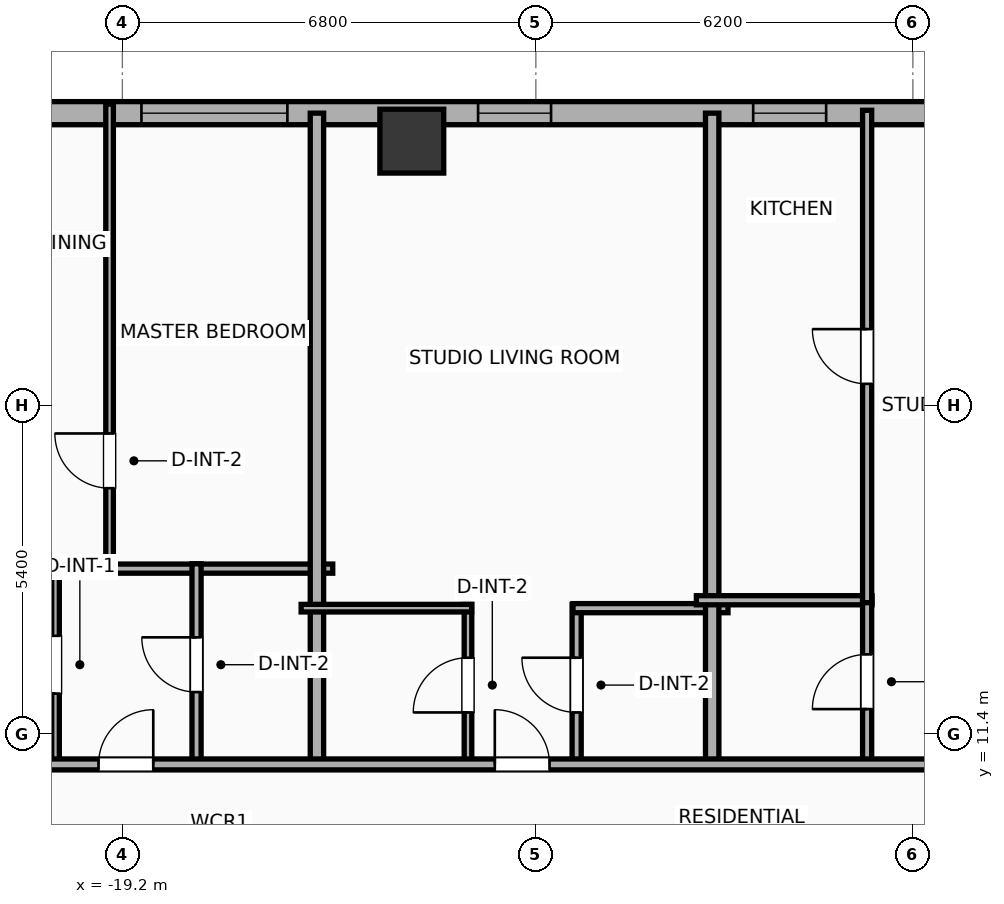
"""IFC4 building model, lengths in metres.
Left out: names, types, materials, properties, quantities, classifications, styles, units other than length and angle.
Written with IfcOpenShell. Run it as: python <this file> out.ifc"""

import sys

from ifc_helpers import new_model, si_unit, direction, frame, frame_2d, origin, origin_2d, place, context, subcontext, project, spatial, rectangle, hollow_rectangle, extrude, element, fill, save


model = new_model("IFC4")
c1 = context("Model", 3, precision=1e-05, world=origin(), true_north=direction((0.0, 1.0)))
c2 = subcontext(c1, "Body", "Model", "MODEL_VIEW")
j1 = project(units=[si_unit("LENGTHUNIT", "METRE"), si_unit("PLANEANGLEUNIT", "RADIAN")], contexts=[c1])
p1 = place(None, origin())
s1 = spatial("IfcSite", under=j1, at=p1, CompositionType="ELEMENT")
p2 = place(p1, origin())
s2 = spatial("IfcBuilding", under=s1, at=p2, CompositionType="ELEMENT")
p3 = place(p2, frame((0.0, 0.0, 89.7)))
s3 = spatial("IfcBuildingStorey", under=s2, at=p3, CompositionType="ELEMENT", Elevation=89.7)
p4 = place(p3, frame((-14.44, 21.15, 0.0), z_axis=(0.0, 0.0, 1.0), x_axis=(1.0, 0.0, 0.0)))
e1 = element("IfcColumn", 1, at=p4, inside=s3, PredefinedType="COLUMN", context=c2, shape_type="SweptSolid", body=[
    extrude(hollow_rectangle(XDim=1.05, YDim=1.05, WallThickness=0.036, at=origin_2d()), origin(), (0.0, 0.0, 1.0), 3.9),
])
p5 = place(p3, frame((-25.381, 21.61, 0.0), z_axis=(0.0, 0.0, 1.0), x_axis=(1.0, 0.0, 0.0)))
e2 = element("IfcWall", 2, at=p5, inside=s3, PredefinedType="ELEMENTEDWALL", context=c2, shape_type="SweptSolid", body=[
    extrude(rectangle(XDim=54.763, YDim=0.38, at=frame_2d((27.381, 0.0))), origin(), (0.0, 0.0, 1.0), 2.54),
])
p6 = place(p5, frame((6.495, 0.0, 0.75)))
e3 = element("IfcOpeningElement", 3, at=p6, cuts=e2, PredefinedType="OPENING", context=c2, shape_type="SweptSolid", body=[
    extrude(rectangle(XDim=2.4, YDim=1.63, at=frame_2d((1.2, 0.815))), frame((0.0, 0.2, 0.0), z_axis=(0.0, -1.0, 0.0), x_axis=(1.0, 0.0, 0.0)), (0.0, 0.0, 1.0), 0.4),
])
p7 = place(p5, frame((48.367, 0.0, 0.75)))
e4 = element("IfcOpeningElement", 4, at=p7, cuts=e2, PredefinedType="OPENING", context=c2, shape_type="SweptSolid", body=[
    extrude(rectangle(XDim=2.4, YDim=1.63, at=frame_2d((1.2, 0.815))), frame((0.0, 0.2, 0.0), z_axis=(0.0, -1.0, 0.0), x_axis=(1.0, 0.0, 0.0)), (0.0, 0.0, 1.0), 0.4),
])
p8 = place(p5, frame((1.231, 0.0, 0.75)))
e5 = element("IfcOpeningElement", 5, at=p8, cuts=e2, PredefinedType="OPENING", context=c2, shape_type="SweptSolid", body=[
    extrude(rectangle(XDim=1.2, YDim=1.63, at=frame_2d((0.6, 0.815))), frame((0.0, 0.2, 0.0), z_axis=(0.0, -1.0, 0.0), x_axis=(1.0, 0.0, 0.0)), (0.0, 0.0, 1.0), 0.4),
])
p9 = place(p5, frame((3.772, 0.0, 0.75)))
e6 = element("IfcOpeningElement", 6, at=p9, cuts=e2, PredefinedType="OPENING", context=c2, shape_type="SweptSolid", body=[
    extrude(rectangle(XDim=1.2, YDim=1.63, at=frame_2d((0.6, 0.815))), frame((0.0, 0.2, 0.0), z_axis=(0.0, -1.0, 0.0), x_axis=(1.0, 0.0, 0.0)), (0.0, 0.0, 1.0), 0.4),
])
p10 = place(p5, frame((12.031, 0.0, 0.75)))
e7 = element("IfcOpeningElement", 7, at=p10, cuts=e2, PredefinedType="OPENING", context=c2, shape_type="SweptSolid", body=[
    extrude(rectangle(XDim=1.2, YDim=1.63, at=frame_2d((0.6, 0.815))), frame((0.0, 0.2, 0.0), z_axis=(0.0, -1.0, 0.0), x_axis=(1.0, 0.0, 0.0)), (0.0, 0.0, 1.0), 0.4),
])
p11 = place(p5, frame((19.805, 0.0, 0.75)))
e8 = element("IfcOpeningElement", 8, at=p11, cuts=e2, PredefinedType="OPENING", context=c2, shape_type="SweptSolid", body=[
    extrude(rectangle(XDim=1.2, YDim=1.63, at=frame_2d((0.6, 0.815))), frame((0.0, 0.2, 0.0), z_axis=(0.0, -1.0, 0.0), x_axis=(1.0, 0.0, 0.0)), (0.0, 0.0, 1.0), 0.4),
])
p12 = place(p5, frame((16.555, 0.0, 0.75)))
e9 = element("IfcOpeningElement", 9, at=p12, cuts=e2, PredefinedType="OPENING", context=c2, shape_type="SweptSolid", body=[
    extrude(rectangle(XDim=1.2, YDim=1.63, at=frame_2d((0.6, 0.815))), frame((0.0, 0.2, 0.0), z_axis=(0.0, -1.0, 0.0), x_axis=(1.0, 0.0, 0.0)), (0.0, 0.0, 1.0), 0.4),
])
p13 = place(p5, frame((23.866, 0.0, 0.75)))
e10 = element("IfcOpeningElement", 10, at=p13, cuts=e2, PredefinedType="OPENING", context=c2, shape_type="SweptSolid", body=[
    extrude(rectangle(XDim=1.2, YDim=1.63, at=frame_2d((0.6, 0.815))), frame((0.0, 0.2, 0.0), z_axis=(0.0, -1.0, 0.0), x_axis=(1.0, 0.0, 0.0)), (0.0, 0.0, 1.0), 0.4),
])
p14 = place(p5, frame((27.116, 0.0, 0.75)))
e11 = element("IfcOpeningElement", 11, at=p14, cuts=e2, PredefinedType="OPENING", context=c2, shape_type="SweptSolid", body=[
    extrude(rectangle(XDim=1.2, YDim=1.63, at=frame_2d((0.6, 0.815))), frame((0.0, 0.2, 0.0), z_axis=(0.0, -1.0, 0.0), x_axis=(1.0, 0.0, 0.0)), (0.0, 0.0, 1.0), 0.4),
])
p15 = place(p5, frame((30.931, 0.0, 0.75)))
e12 = element("IfcOpeningElement", 12, at=p15, cuts=e2, PredefinedType="OPENING", context=c2, shape_type="SweptSolid", body=[
    extrude(rectangle(XDim=1.2, YDim=1.63, at=frame_2d((0.6, 0.815))), frame((0.0, 0.2, 0.0), z_axis=(0.0, -1.0, 0.0), x_axis=(1.0, 0.0, 0.0)), (0.0, 0.0, 1.0), 0.4),
])
p16 = place(p5, frame((36.733, 0.0, 0.75)))
e13 = element("IfcOpeningElement", 13, at=p16, cuts=e2, PredefinedType="OPENING", context=c2, shape_type="SweptSolid", body=[
    extrude(rectangle(XDim=1.2, YDim=1.63, at=frame_2d((0.6, 0.815))), frame((0.0, 0.2, 0.0), z_axis=(0.0, -1.0, 0.0), x_axis=(1.0, 0.0, 0.0)), (0.0, 0.0, 1.0), 0.4),
])
p17 = place(p5, frame((39.858, 0.0, 0.75)))
e14 = element("IfcOpeningElement", 14, at=p17, cuts=e2, PredefinedType="OPENING", context=c2, shape_type="SweptSolid", body=[
    extrude(rectangle(XDim=1.2, YDim=1.63, at=frame_2d((0.6, 0.815))), frame((0.0, 0.2, 0.0), z_axis=(0.0, -1.0, 0.0), x_axis=(1.0, 0.0, 0.0)), (0.0, 0.0, 1.0), 0.4),
])
p18 = place(p5, frame((44.636, 0.0, 0.75)))
e15 = element("IfcOpeningElement", 15, at=p18, cuts=e2, PredefinedType="OPENING", context=c2, shape_type="SweptSolid", body=[
    extrude(rectangle(XDim=1.2, YDim=1.63, at=frame_2d((0.6, 0.815))), frame((0.0, 0.2, 0.0), z_axis=(0.0, -1.0, 0.0), x_axis=(1.0, 0.0, 0.0)), (0.0, 0.0, 1.0), 0.4),
])
p19 = place(p5, frame((51.809, 0.0, 0.75)))
e16 = element("IfcOpeningElement", 16, at=p19, cuts=e2, PredefinedType="OPENING", context=c2, shape_type="SweptSolid", body=[
    extrude(rectangle(XDim=1.2, YDim=1.63, at=frame_2d((0.6, 0.815))), frame((0.0, 0.2, 0.0), z_axis=(0.0, -1.0, 0.0), x_axis=(1.0, 0.0, 0.0)), (0.0, 0.0, 1.0), 0.4),
])
p20 = place(p3, frame((-19.41, 14.04, 0.0), z_axis=(0.0, 0.0, 1.0), x_axis=(0.0, 1.0, 0.0)))
e17 = element("IfcWall", 17, at=p20, inside=s3, PredefinedType="PARTITIONING", context=c2, shape_type="SweptSolid", body=[
    extrude(rectangle(XDim=7.72, YDim=0.125, at=frame_2d((3.86, 0.0))), origin(), (0.0, 0.0, 1.0), 3.65),
])
p21 = place(p20, frame((1.403, 0.0, 0.0)))
e18 = element("IfcOpeningElement", 18, at=p21, cuts=e17, PredefinedType="OPENING", context=c2, shape_type="SweptSolid", body=[
    extrude(rectangle(XDim=0.9, YDim=2.05, at=frame_2d((0.45, 1.025))), frame((0.0, 0.073, 0.0), z_axis=(0.0, -1.0, 0.0), x_axis=(1.0, 0.0, 0.0)), (0.0, 0.0, 1.0), 0.145),
])
p22 = place(p3, frame((-19.53, 14.12, 0.0), z_axis=(0.0, 0.0, 1.0), x_axis=(1.0, 0.0, 0.0)))
e19 = element("IfcWall", 19, at=p22, inside=s3, PredefinedType="PLUMBINGWALL", context=c2, shape_type="SweptSolid", body=[
    extrude(rectangle(XDim=3.79, YDim=0.15, at=frame_2d((1.895, 0.0))), origin(), (0.0, 0.0, 1.0), 3.65),
])
p23 = place(p3, frame((-20.299, 10.88, 0.0), z_axis=(0.0, 0.0, 1.0), x_axis=(0.0, 1.0, 0.0)))
e20 = element("IfcWall", 20, at=p23, inside=s3, PredefinedType="PARTITIONING", context=c2, shape_type="SweptSolid", body=[
    extrude(rectangle(XDim=3.32, YDim=0.125, at=frame_2d((1.66, 0.0))), origin(), (0.0, 0.0, 1.0), 3.65),
])
p24 = place(p23, frame((1.185, 0.0, 0.0)))
e21 = element("IfcOpeningElement", 21, at=p24, cuts=e20, PredefinedType="OPENING", context=c2, shape_type="SweptSolid", body=[
    extrude(rectangle(XDim=0.95, YDim=2.05, at=frame_2d((0.475, 1.025))), frame((0.0, 0.073, 0.0), z_axis=(0.0, -1.0, 0.0), x_axis=(1.0, 0.0, 0.0)), (0.0, 0.0, 1.0), 0.145),
])
p25 = place(p3, frame((-22.684, 14.12, 0.0), z_axis=(0.0, 0.0, 1.0), x_axis=(1.0, 0.0, 0.0)))
e22 = element("IfcWall", 22, at=p25, inside=s3, PredefinedType="PARTITIONING", context=c2, shape_type="SweptSolid", body=[
    extrude(rectangle(XDim=2.505, YDim=0.125, at=frame_2d((1.252, 0.0))), origin(), (0.0, 0.0, 1.0), 3.65),
])
p26 = place(p3, frame((-17.98, 10.88, 0.0), z_axis=(0.0, 0.0, 1.0), x_axis=(0.0, 1.0, 0.0)))
e23 = element("IfcWall", 23, at=p26, inside=s3, PredefinedType="PLUMBINGWALL", context=c2, shape_type="SweptSolid", body=[
    extrude(rectangle(XDim=3.32, YDim=0.15, at=frame_2d((1.66, 0.0))), origin(), (0.0, 0.0, 1.0), 3.65),
])
p27 = place(p26, frame((1.21, 0.0, 0.0)))
e24 = element("IfcOpeningElement", 24, at=p27, cuts=e23, PredefinedType="OPENING", context=c2, shape_type="SweptSolid", body=[
    extrude(rectangle(XDim=0.9, YDim=2.05, at=frame_2d((0.45, 1.025))), frame((0.0, 0.085, 0.0), z_axis=(0.0, -1.0, 0.0), x_axis=(1.0, 0.0, 0.0)), (0.0, 0.0, 1.0), 0.17),
])
p28 = place(p3, frame((-16.0, 10.82, 0.0), z_axis=(0.0, 0.0, 1.0), x_axis=(0.0, 1.0, 0.0)))
e25 = element("IfcWall", 25, at=p28, inside=s3, PredefinedType="PARTITIONING", context=c2, shape_type="SweptSolid", body=[
    extrude(rectangle(XDim=10.79, YDim=0.22, at=frame_2d((5.395, 0.0))), origin(), (0.0, 0.0, 1.0), 3.65),
])
p29 = place(p3, frame((-13.516, 10.88, 0.0), z_axis=(0.0, 0.0, 1.0), x_axis=(0.0, 1.0, 0.0)))
e26 = element("IfcWall", 26, at=p29, inside=s3, PredefinedType="PARTITIONING", context=c2, shape_type="SweptSolid", body=[
    extrude(rectangle(XDim=2.65, YDim=0.125, at=frame_2d((1.325, 0.0))), origin(), (0.0, 0.0, 1.0), 3.65),
])
p30 = place(p29, frame((0.875, 0.0, 0.0)))
e27 = element("IfcOpeningElement", 27, at=p30, cuts=e26, PredefinedType="OPENING", context=c2, shape_type="SweptSolid", body=[
    extrude(rectangle(XDim=0.9, YDim=2.05, at=frame_2d((0.45, 1.025))), frame((0.0, 0.073, 0.0), z_axis=(0.0, -1.0, 0.0), x_axis=(1.0, 0.0, 0.0)), (0.0, 0.0, 1.0), 0.145),
])
p31 = place(p3, frame((-11.729, 10.88, 0.0), z_axis=(0.0, 0.0, 1.0), x_axis=(0.0, 1.0, 0.0)))
e28 = element("IfcWall", 28, at=p31, inside=s3, PredefinedType="PLUMBINGWALL", context=c2, shape_type="SweptSolid", body=[
    extrude(rectangle(XDim=2.65, YDim=0.15, at=frame_2d((1.325, 0.0))), origin(), (0.0, 0.0, 1.0), 3.65),
])
p32 = place(p31, frame((0.875, 0.0, 0.0)))
e29 = element("IfcOpeningElement", 29, at=p32, cuts=e28, PredefinedType="OPENING", context=c2, shape_type="SweptSolid", body=[
    extrude(rectangle(XDim=0.9, YDim=2.05, at=frame_2d((0.45, 1.025))), frame((0.0, 0.085, 0.0), z_axis=(0.0, -1.0, 0.0), x_axis=(1.0, 0.0, 0.0)), (0.0, 0.0, 1.0), 0.17),
])
p33 = place(p3, frame((-16.26, 13.47, 0.0), z_axis=(0.0, 0.0, 1.0), x_axis=(1.0, 0.0, 0.0)))
e30 = element("IfcWall", 30, at=p33, inside=s3, PredefinedType="PARTITIONING", context=c2, shape_type="SweptSolid", body=[
    extrude(rectangle(XDim=2.804, YDim=0.125, at=frame_2d((1.402, 0.0))), origin(), (0.0, 0.0, 1.0), 3.65),
])
p34 = place(p3, frame((-11.789, 13.47, 0.0), z_axis=(0.0, 0.0, 1.0), x_axis=(1.0, 0.0, 0.0)))
e31 = element("IfcWall", 31, at=p34, inside=s3, PredefinedType="PLUMBINGWALL", context=c2, shape_type="SweptSolid", body=[
    extrude(rectangle(XDim=2.549, YDim=0.15, at=frame_2d((1.274, 0.0))), origin(), (0.0, 0.0, 1.0), 3.65),
])
p35 = place(p3, frame((-9.5, 10.82, 0.0), z_axis=(0.0, 0.0, 1.0), x_axis=(0.0, 1.0, 0.0)))
e32 = element("IfcWall", 32, at=p35, inside=s3, PredefinedType="PARTITIONING", context=c2, shape_type="SweptSolid", body=[
    extrude(rectangle(XDim=10.79, YDim=0.22, at=frame_2d((5.395, 0.0))), origin(), (0.0, 0.0, 1.0), 3.65),
])
p36 = place(p3, frame((-9.76, 13.6, 0.0), z_axis=(0.0, 0.0, 1.0), x_axis=(1.0, 0.0, 0.0)))
e33 = element("IfcWall", 33, at=p36, inside=s3, PredefinedType="PLUMBINGWALL", context=c2, shape_type="SweptSolid", body=[
    extrude(rectangle(XDim=2.888, YDim=0.15, at=frame_2d((1.444, 0.0))), origin(), (0.0, 0.0, 1.0), 3.65),
])
p37 = place(p3, frame((-6.952, 10.88, 0.0), z_axis=(0.0, 0.0, 1.0), x_axis=(0.0, 1.0, 0.0)))
e34 = element("IfcWall", 34, at=p37, inside=s3, PredefinedType="PLUMBINGWALL", context=c2, shape_type="SweptSolid", body=[
    extrude(rectangle(XDim=2.76, YDim=0.15, at=frame_2d((1.38, 0.0))), origin(), (0.0, 0.0, 1.0), 3.65),
])
p38 = place(p37, frame((0.93, 0.0, 0.0)))
e35 = element("IfcOpeningElement", 35, at=p38, cuts=e34, PredefinedType="OPENING", context=c2, shape_type="SweptSolid", body=[
    extrude(rectangle(XDim=0.9, YDim=2.05, at=frame_2d((0.45, 1.025))), frame((0.0, 0.085, 0.0), z_axis=(0.0, -1.0, 0.0), x_axis=(1.0, 0.0, 0.0)), (0.0, 0.0, 1.0), 0.17),
])
p39 = place(p3, frame((-6.952, 13.56, 0.0), z_axis=(0.0, 0.0, 1.0), x_axis=(0.0, 1.0, 0.0)))
e36 = element("IfcWall", 36, at=p39, inside=s3, PredefinedType="PLUMBINGWALL", context=c2, shape_type="SweptSolid", body=[
    extrude(rectangle(XDim=8.098, YDim=0.15, at=frame_2d((4.049, 0.0))), origin(), (0.0, 0.0, 1.0), 3.65),
])
p40 = place(p39, frame((3.599, 0.0, 0.0)))
e37 = element("IfcOpeningElement", 37, at=p40, cuts=e36, PredefinedType="OPENING", context=c2, shape_type="SweptSolid", body=[
    extrude(rectangle(XDim=0.9, YDim=2.05, at=frame_2d((0.45, 1.025))), frame((0.0, 0.085, 0.0), z_axis=(0.0, -1.0, 0.0), x_axis=(1.0, 0.0, 0.0)), (0.0, 0.0, 1.0), 0.17),
])
p41 = place(p3, frame((-29.21, 10.9, 0.0), z_axis=(0.0, 0.0, 1.0), x_axis=(1.0, 0.0, 0.0)))
e38 = element("IfcWall", 38, at=p41, inside=s3, PredefinedType="PARTITIONING", context=c2, shape_type="SweptSolid", body=[
    extrude(rectangle(XDim=62.42, YDim=0.18, at=frame_2d((31.21, 0.0))), origin(), (0.0, 0.0, 1.0), 3.65),
])
p42 = place(p41, frame((2.983, 0.0, 0.0)))
e39 = element("IfcOpeningElement", 39, at=p42, cuts=e38, PredefinedType="OPENING", context=c2, shape_type="SweptSolid", body=[
    extrude(rectangle(XDim=0.9, YDim=2.05, at=frame_2d((0.45, 1.025))), frame((0.0, 0.1, 0.0), z_axis=(0.0, -1.0, 0.0), x_axis=(1.0, 0.0, 0.0)), (0.0, 0.0, 1.0), 0.2),
])
p43 = place(p41, frame((9.618, 0.0, 0.0)))
e40 = element("IfcOpeningElement", 40, at=p43, cuts=e38, PredefinedType="OPENING", context=c2, shape_type="SweptSolid", body=[
    extrude(rectangle(XDim=0.9, YDim=2.05, at=frame_2d((0.45, 1.025))), frame((0.0, 0.1, 0.0), z_axis=(0.0, -1.0, 0.0), x_axis=(1.0, 0.0, 0.0)), (0.0, 0.0, 1.0), 0.2),
])
p44 = place(p41, frame((16.135, 0.0, 0.0)))
e41 = element("IfcOpeningElement", 41, at=p44, cuts=e38, PredefinedType="OPENING", context=c2, shape_type="SweptSolid", body=[
    extrude(rectangle(XDim=0.9, YDim=2.05, at=frame_2d((0.45, 1.025))), frame((0.0, 0.1, 0.0), z_axis=(0.0, -1.0, 0.0), x_axis=(1.0, 0.0, 0.0)), (0.0, 0.0, 1.0), 0.2),
])
p45 = place(p41, frame((23.632, 0.0, 0.0)))
e42 = element("IfcOpeningElement", 42, at=p45, cuts=e38, PredefinedType="OPENING", context=c2, shape_type="SweptSolid", body=[
    extrude(rectangle(XDim=1.15, YDim=2.05, at=frame_2d((0.575, 1.025))), frame((0.0, 0.1, 0.0), z_axis=(0.0, -1.0, 0.0), x_axis=(1.0, 0.0, 0.0)), (0.0, 0.0, 1.0), 0.2),
])
p46 = place(p41, frame((27.751, 0.0, 0.0)))
e43 = element("IfcOpeningElement", 43, at=p46, cuts=e38, PredefinedType="OPENING", context=c2, shape_type="SweptSolid", body=[
    extrude(rectangle(XDim=1.15, YDim=2.05, at=frame_2d((0.575, 1.025))), frame((0.0, 0.1, 0.0), z_axis=(0.0, -1.0, 0.0), x_axis=(1.0, 0.0, 0.0)), (0.0, 0.0, 1.0), 0.2),
])
p47 = place(p41, frame((35.635, 0.0, 0.0)))
e44 = element("IfcOpeningElement", 44, at=p47, cuts=e38, PredefinedType="OPENING", context=c2, shape_type="SweptSolid", body=[
    extrude(rectangle(XDim=0.9, YDim=2.05, at=frame_2d((0.45, 1.025))), frame((0.0, 0.1, 0.0), z_axis=(0.0, -1.0, 0.0), x_axis=(1.0, 0.0, 0.0)), (0.0, 0.0, 1.0), 0.2),
])
p48 = place(p41, frame((40.616, 0.0, 0.0)))
e45 = element("IfcOpeningElement", 45, at=p48, cuts=e38, PredefinedType="OPENING", context=c2, shape_type="SweptSolid", body=[
    extrude(rectangle(XDim=1.15, YDim=2.05, at=frame_2d((0.575, 1.025))), frame((0.0, 0.1, 0.0), z_axis=(0.0, -1.0, 0.0), x_axis=(1.0, 0.0, 0.0)), (0.0, 0.0, 1.0), 0.2),
])
p49 = place(p41, frame((48.256, 0.0, 0.0)))
e46 = element("IfcOpeningElement", 46, at=p49, cuts=e38, PredefinedType="OPENING", context=c2, shape_type="SweptSolid", body=[
    extrude(rectangle(XDim=0.9, YDim=2.05, at=frame_2d((0.45, 1.025))), frame((0.0, 0.1, 0.0), z_axis=(0.0, -1.0, 0.0), x_axis=(1.0, 0.0, 0.0)), (0.0, 0.0, 1.0), 0.2),
])
p50 = place(p41, frame((57.032, 0.0, 0.0)))
e47 = element("IfcOpeningElement", 47, at=p50, cuts=e38, PredefinedType="OPENING", context=c2, shape_type="SweptSolid", body=[
    extrude(rectangle(XDim=1.15, YDim=2.05, at=frame_2d((0.575, 1.025))), frame((0.0, 0.1, 0.0), z_axis=(0.0, -1.0, 0.0), x_axis=(1.0, 0.0, 0.0)), (0.0, 0.0, 1.0), 0.2),
])
p51 = place(p6, origin())
e48 = element("IfcWindow", 48, at=p51, inside=s3, PartitioningType="SINGLE_PANEL", PredefinedType="WINDOW", context=c2, shape_type="SweptSolid", body=[
    extrude(rectangle(XDim=2.4, YDim=1.63, at=frame_2d((1.2, 0.815))), frame((0.0, 0.03, 0.0), z_axis=(0.0, -1.0, 0.0), x_axis=(1.0, 0.0, 0.0)), (0.0, 0.0, 1.0), 0.06),
])
fill(e3, e48)
p52 = place(p10, origin())
e49 = element("IfcWindow", 49, at=p52, inside=s3, PartitioningType="SINGLE_PANEL", PredefinedType="WINDOW", context=c2, shape_type="SweptSolid", body=[
    extrude(rectangle(XDim=1.2, YDim=1.63, at=frame_2d((0.6, 0.815))), frame((0.0, 0.03, 0.0), z_axis=(0.0, -1.0, 0.0), x_axis=(1.0, 0.0, 0.0)), (0.0, 0.0, 1.0), 0.06),
])
fill(e7, e49)
p53 = place(p12, origin())
e50 = element("IfcWindow", 50, at=p53, inside=s3, PartitioningType="SINGLE_PANEL", PredefinedType="WINDOW", context=c2, shape_type="SweptSolid", body=[
    extrude(rectangle(XDim=1.2, YDim=1.63, at=frame_2d((0.6, 0.815))), frame((0.0, 0.03, 0.0), z_axis=(0.0, -1.0, 0.0), x_axis=(1.0, 0.0, 0.0)), (0.0, 0.0, 1.0), 0.06),
])
fill(e9, e50)
p54 = place(p21, origin())
e51 = element("IfcDoor", 51, at=p54, inside=s3, OperationType="SINGLE_SWING_RIGHT", PredefinedType="DOOR", context=c2, shape_type="SweptSolid", body=[
    extrude(rectangle(XDim=0.9, YDim=2.05, at=frame_2d((0.45, 1.025))), frame((0.0, 0.025, 0.0), z_axis=(0.0, -1.0, 0.0), x_axis=(1.0, 0.0, 0.0)), (0.0, 0.0, 1.0), 0.05),
])
fill(e18, e51)
p55 = place(p24, origin())
e52 = element("IfcDoor", 52, at=p55, inside=s3, OperationType="SINGLE_SWING_LEFT", PredefinedType="DOOR", context=c2, shape_type="SweptSolid", body=[
    extrude(rectangle(XDim=0.95, YDim=2.05, at=frame_2d((0.475, 1.025))), frame((0.0, 0.025, 0.0), z_axis=(0.0, -1.0, 0.0), x_axis=(1.0, 0.0, 0.0)), (0.0, 0.0, 1.0), 0.05),
])
fill(e21, e52)
p56 = place(p27, origin())
e53 = element("IfcDoor", 53, at=p56, inside=s3, OperationType="SINGLE_SWING_RIGHT", PredefinedType="DOOR", context=c2, shape_type="SweptSolid", body=[
    extrude(rectangle(XDim=0.9, YDim=2.05, at=frame_2d((0.45, 1.025))), frame((0.0, 0.025, 0.0), z_axis=(0.0, -1.0, 0.0), x_axis=(1.0, 0.0, 0.0)), (0.0, 0.0, 1.0), 0.05),
])
fill(e24, e53)
p57 = place(p30, origin())
e54 = element("IfcDoor", 54, at=p57, inside=s3, OperationType="SINGLE_SWING_LEFT", PredefinedType="DOOR", context=c2, shape_type="SweptSolid", body=[
    extrude(rectangle(XDim=0.9, YDim=2.05, at=frame_2d((0.45, 1.025))), frame((0.0, 0.025, 0.0), z_axis=(0.0, -1.0, 0.0), x_axis=(1.0, 0.0, 0.0)), (0.0, 0.0, 1.0), 0.05),
])
fill(e27, e54)
p58 = place(p32, origin())
e55 = element("IfcDoor", 55, at=p58, inside=s3, OperationType="SINGLE_SWING_RIGHT", PredefinedType="DOOR", context=c2, shape_type="SweptSolid", body=[
    extrude(rectangle(XDim=0.9, YDim=2.05, at=frame_2d((0.45, 1.025))), frame((0.0, 0.025, 0.0), z_axis=(0.0, -1.0, 0.0), x_axis=(1.0, 0.0, 0.0)), (0.0, 0.0, 1.0), 0.05),
])
fill(e29, e55)
p59 = place(p38, origin())
e56 = element("IfcDoor", 56, at=p59, inside=s3, OperationType="SINGLE_SWING_LEFT", PredefinedType="DOOR", context=c2, shape_type="SweptSolid", body=[
    extrude(rectangle(XDim=0.9, YDim=2.05, at=frame_2d((0.45, 1.025))), frame((0.0, 0.025, 0.0), z_axis=(0.0, -1.0, 0.0), x_axis=(1.0, 0.0, 0.0)), (0.0, 0.0, 1.0), 0.05),
])
fill(e35, e56)
p60 = place(p40, origin())
e57 = element("IfcDoor", 57, at=p60, inside=s3, OperationType="SINGLE_SWING_RIGHT", PredefinedType="DOOR", context=c2, shape_type="SweptSolid", body=[
    extrude(rectangle(XDim=0.9, YDim=2.05, at=frame_2d((0.45, 1.025))), frame((0.0, 0.025, 0.0), z_axis=(0.0, -1.0, 0.0), x_axis=(1.0, 0.0, 0.0)), (0.0, 0.0, 1.0), 0.05),
])
fill(e37, e57)
p61 = place(p43, origin())
e58 = element("IfcDoor", 58, at=p61, inside=s3, OperationType="SINGLE_SWING_RIGHT", PredefinedType="DOOR", context=c2, shape_type="SweptSolid", body=[
    extrude(rectangle(XDim=0.9, YDim=2.05, at=frame_2d((0.45, 1.025))), frame((0.0, 0.025, 0.0), z_axis=(0.0, -1.0, 0.0), x_axis=(1.0, 0.0, 0.0)), (0.0, 0.0, 1.0), 0.05),
])
fill(e40, e58)
p62 = place(p44, origin())
e59 = element("IfcDoor", 59, at=p62, inside=s3, OperationType="SINGLE_SWING_LEFT", PredefinedType="DOOR", context=c2, shape_type="SweptSolid", body=[
    extrude(rectangle(XDim=0.9, YDim=2.05, at=frame_2d((0.45, 1.025))), frame((0.0, 0.025, 0.0), z_axis=(0.0, -1.0, 0.0), x_axis=(1.0, 0.0, 0.0)), (0.0, 0.0, 1.0), 0.05),
])
fill(e41, e59)
save(model, sys.argv[1])
